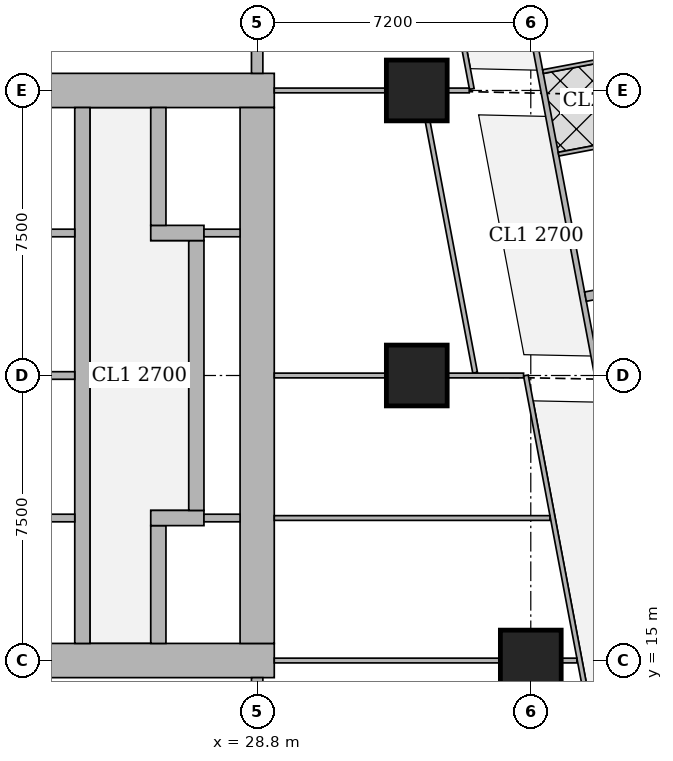
"""IFC4 building model, lengths in metres.
Left out: names, types, materials, properties, quantities, classifications, styles, units other than length and angle.
Written with IfcOpenShell. Run it as: python <this file> out.ifc"""

import sys

from ifc_helpers import new_model, si_unit, direction, frame, frame_2d, origin, origin_2d, place, context, subcontext, project, spatial, rectangle, extrude, element, fill, save


model = new_model("IFC4")
c1 = context("Model", 3, precision=1e-05, world=origin(), true_north=direction((0.0, 1.0)))
c2 = subcontext(c1, "Body", "Model", "MODEL_VIEW")
j1 = project(units=[si_unit("LENGTHUNIT", "METRE"), si_unit("PLANEANGLEUNIT", "RADIAN")], contexts=[c1])
p1 = place(None, origin())
s1 = spatial("IfcSite", under=j1, at=p1, CompositionType="ELEMENT")
p2 = place(p1, origin())
s2 = spatial("IfcBuilding", under=s1, at=p2, CompositionType="ELEMENT")
p3 = place(p2, frame((0.0, 0.0, 81.65)))
s3 = spatial("IfcBuildingStorey", under=s2, at=p3, CompositionType="ELEMENT", Elevation=81.65)
for number, where, z_axis, x_axis in (
    (1, (36.0, 15.0, 0.0), (0.0, 0.0, 1.0), (1.0, 0.0, 0.0)),
    (2, (33.0, 22.5, 0.0), (0.0, 0.0, 1.0), (1.0, 0.0, 0.0)),
    (3, (33.0, 30.0, 0.0), (0.0, 0.0, 1.0), (1.0, 0.0, 0.0)),
):
    element("IfcColumn", number, at=place(p3, frame(where, z_axis=z_axis, x_axis=x_axis)), inside=s3, PredefinedType="COLUMN", context=c2, shape_type="SweptSolid", body=[
        extrude(rectangle(XDim=1.6, YDim=1.6, at=origin_2d()), origin(), (0.0, 0.0, 1.0), 3.75),
    ])
p4 = place(p3, frame((13.95, 15.0, 0.0), z_axis=(0.0, 0.0, 1.0), x_axis=(1.0, 0.0, 0.0)))
e4 = element("IfcWall", 4, at=p4, inside=s3, PredefinedType="SHEAR", context=c2, shape_type="SweptSolid", body=[
    extrude(rectangle(XDim=15.3, YDim=0.9, at=frame_2d((7.65, 0.0))), origin(), (0.0, 0.0, 1.0), 3.75),
])
p5 = place(p4, frame((4.45, 0.0, 0.0)))
e5 = element("IfcOpeningElement", 5, at=p5, cuts=e4, PredefinedType="OPENING", context=c2, shape_type="SweptSolid", body=[
    extrude(rectangle(XDim=1.8, YDim=2.1, at=frame_2d((0.9, 1.05))), frame((0.0, 0.46, 0.0), z_axis=(0.0, -1.0, 0.0), x_axis=(1.0, 0.0, 0.0)), (0.0, 0.0, 1.0), 0.92),
])
p6 = place(p4, frame((10.7, 0.0, 0.0)))
e6 = element("IfcOpeningElement", 6, at=p6, cuts=e4, PredefinedType="OPENING", context=c2, shape_type="SweptSolid", body=[
    extrude(rectangle(XDim=1.1, YDim=2.1, at=frame_2d((0.55, 1.05))), frame((0.0, 0.46, 0.0), z_axis=(0.0, -1.0, 0.0), x_axis=(1.0, 0.0, 0.0)), (0.0, 0.0, 1.0), 0.92),
])
p7 = place(p3, frame((13.95, 30.0, 0.0), z_axis=(0.0, 0.0, 1.0), x_axis=(1.0, 0.0, 0.0)))
e7 = element("IfcWall", 7, at=p7, inside=s3, PredefinedType="SHEAR", context=c2, shape_type="SweptSolid", body=[
    extrude(rectangle(XDim=15.3, YDim=0.9, at=frame_2d((7.65, 0.0))), origin(), (0.0, 0.0, 1.0), 3.75),
])
p8 = place(p7, frame((4.45, 0.0, 0.0)))
e8 = element("IfcOpeningElement", 8, at=p8, cuts=e7, PredefinedType="OPENING", context=c2, shape_type="SweptSolid", body=[
    extrude(rectangle(XDim=1.8, YDim=2.1, at=frame_2d((0.9, 1.05))), frame((0.0, 0.46, 0.0), z_axis=(0.0, -1.0, 0.0), x_axis=(1.0, 0.0, 0.0)), (0.0, 0.0, 1.0), 0.92),
])
p9 = place(p7, frame((10.7, 0.0, 0.0)))
e9 = element("IfcOpeningElement", 9, at=p9, cuts=e7, PredefinedType="OPENING", context=c2, shape_type="SweptSolid", body=[
    extrude(rectangle(XDim=1.1, YDim=2.1, at=frame_2d((0.55, 1.05))), frame((0.0, 0.46, 0.0), z_axis=(0.0, -1.0, 0.0), x_axis=(1.0, 0.0, 0.0)), (0.0, 0.0, 1.0), 0.92),
])
p10 = place(p3, frame((28.8, 15.45, 0.0), z_axis=(0.0, 0.0, 1.0), x_axis=(0.0, 1.0, 0.0)))
e10 = element("IfcWall", 10, at=p10, inside=s3, PredefinedType="SHEAR", context=c2, shape_type="SweptSolid", body=[
    extrude(rectangle(XDim=14.1, YDim=0.9, at=frame_2d((7.05, 0.0))), origin(), (0.0, 0.0, 1.0), 3.75),
])
p11 = place(p3, frame((24.2, 15.45, 0.0), z_axis=(0.0, 0.0, 1.0), x_axis=(0.0, 1.0, 0.0)))
e11 = element("IfcWall", 11, at=p11, inside=s3, PredefinedType="SHEAR", context=c2, shape_type="SweptSolid", body=[
    extrude(rectangle(XDim=14.1, YDim=0.4, at=frame_2d((7.05, 0.0))), origin(), (0.0, 0.0, 1.0), 3.75),
])
p12 = place(p3, frame((26.2, 15.45, 0.0), z_axis=(0.0, 0.0, 1.0), x_axis=(0.0, 1.0, 0.0)))
e12 = element("IfcWall", 12, at=p12, inside=s3, PredefinedType="SHEAR", context=c2, shape_type="SweptSolid", body=[
    extrude(rectangle(XDim=3.1, YDim=0.4, at=frame_2d((1.55, 0.0))), origin(), (0.0, 0.0, 1.0), 3.75),
])
p13 = place(p12, frame((0.825, 0.0, 0.0)))
e13 = element("IfcOpeningElement", 13, at=p13, cuts=e12, PredefinedType="OPENING", context=c2, shape_type="SweptSolid", body=[
    extrude(rectangle(XDim=1.2, YDim=2.1, at=frame_2d((0.6, 1.05))), frame((0.0, 0.21, 0.0), z_axis=(0.0, -1.0, 0.0), x_axis=(1.0, 0.0, 0.0)), (0.0, 0.0, 1.0), 0.42),
])
p14 = place(p3, frame((26.0, 18.75, 0.0), z_axis=(0.0, 0.0, 1.0), x_axis=(1.0, 0.0, 0.0)))
e14 = element("IfcWall", 14, at=p14, inside=s3, PredefinedType="SHEAR", context=c2, shape_type="SweptSolid", body=[
    extrude(rectangle(XDim=1.4, YDim=0.4, at=frame_2d((0.7, 0.0))), origin(), (0.0, 0.0, 1.0), 3.75),
])
p15 = place(p3, frame((27.2, 18.95, 0.0), z_axis=(0.0, 0.0, 1.0), x_axis=(0.0, 1.0, 0.0)))
e15 = element("IfcWall", 15, at=p15, inside=s3, PredefinedType="SHEAR", context=c2, shape_type="SweptSolid", body=[
    extrude(rectangle(XDim=7.1, YDim=0.4, at=frame_2d((3.55, 0.0))), origin(), (0.0, 0.0, 1.0), 3.75),
])
p16 = place(p3, frame((26.0, 26.25, 0.0), z_axis=(0.0, 0.0, 1.0), x_axis=(1.0, 0.0, 0.0)))
e16 = element("IfcWall", 16, at=p16, inside=s3, PredefinedType="SHEAR", context=c2, shape_type="SweptSolid", body=[
    extrude(rectangle(XDim=1.4, YDim=0.4, at=frame_2d((0.7, 0.0))), origin(), (0.0, 0.0, 1.0), 3.75),
])
p17 = place(p3, frame((26.2, 26.45, 0.0), z_axis=(0.0, 0.0, 1.0), x_axis=(0.0, 1.0, 0.0)))
e17 = element("IfcWall", 17, at=p17, inside=s3, PredefinedType="SHEAR", context=c2, shape_type="SweptSolid", body=[
    extrude(rectangle(XDim=3.1, YDim=0.4, at=frame_2d((1.55, 0.0))), origin(), (0.0, 0.0, 1.0), 3.75),
])
p18 = place(p17, frame((1.075, 0.0, 0.0)))
e18 = element("IfcOpeningElement", 18, at=p18, cuts=e17, PredefinedType="OPENING", context=c2, shape_type="SweptSolid", body=[
    extrude(rectangle(XDim=1.2, YDim=2.1, at=frame_2d((0.6, 1.05))), frame((0.0, 0.21, 0.0), z_axis=(0.0, -1.0, 0.0), x_axis=(1.0, 0.0, 0.0)), (0.0, 0.0, 1.0), 0.42),
])
for number, where, z_axis, x_axis in (
    (19, (28.8, 10.35, 0.0), (0.0, 0.0, 1.0), (0.0, 1.0, 0.0)),
    (20, (28.8, 30.45, 0.0), (0.0, 0.0, 1.0), (0.0, 1.0, 0.0)),
):
    element("IfcWall", number, at=place(p3, frame(where, z_axis=z_axis, x_axis=x_axis)), inside=s3, PredefinedType="SHEAR", context=c2, shape_type="SweptSolid", body=[
        extrude(rectangle(XDim=4.2, YDim=0.3, at=frame_2d((2.1, 0.0))), origin(), (0.0, 0.0, 1.0), 3.75),
    ])
p19 = place(p3, frame((33.382, 45.65, 0.0), z_axis=(0.0, 0.0, 1.0), x_axis=(0.185593544777, -0.982626600565, 0.0)))
e21 = element("IfcWall", 21, at=p19, inside=s3, PredefinedType="SOLIDWALL", context=c2, shape_type="SweptSolid", body=[
    extrude(rectangle(XDim=47.118, YDim=0.15, at=frame_2d((23.559, 0.0))), origin(), (0.0, 0.0, 1.0), 2.2),
])
p20 = place(p19, frame((19.054, 0.0, 0.0)))
e22 = element("IfcOpeningElement", 22, at=p20, cuts=e21, PredefinedType="OPENING", context=c2, shape_type="SweptSolid", body=[
    extrude(rectangle(XDim=1.0, YDim=2.1, at=frame_2d((0.5, 1.05))), frame((0.0, 0.085, 0.0), z_axis=(0.0, -1.0, 0.0), x_axis=(1.0, 0.0, 0.0)), (0.0, 0.0, 1.0), 0.17),
])
p21 = place(p19, frame((22.87, 0.0, 0.0)))
e23 = element("IfcOpeningElement", 23, at=p21, cuts=e21, PredefinedType="OPENING", context=c2, shape_type="SweptSolid", body=[
    extrude(rectangle(XDim=1.0, YDim=2.1, at=frame_2d((0.5, 1.05))), frame((0.0, 0.085, 0.0), z_axis=(0.0, -1.0, 0.0), x_axis=(1.0, 0.0, 0.0)), (0.0, 0.0, 1.0), 0.17),
])
p22 = place(p19, frame((33.833, 0.0, 0.0)))
e24 = element("IfcOpeningElement", 24, at=p22, cuts=e21, PredefinedType="OPENING", context=c2, shape_type="SweptSolid", body=[
    extrude(rectangle(XDim=1.0, YDim=2.1, at=frame_2d((0.5, 1.05))), frame((0.0, 0.085, 0.0), z_axis=(0.0, -1.0, 0.0), x_axis=(1.0, 0.0, 0.0)), (0.0, 0.0, 1.0), 0.17),
])
p23 = place(p3, frame((37.473, 42.309, 0.0), z_axis=(0.0, 0.0, 1.0), x_axis=(0.185570636839, -0.982630927024, 0.0)))
e25 = element("IfcWall", 25, at=p23, inside=s3, PredefinedType="PARTITIONING", context=c2, shape_type="SweptSolid", body=[
    extrude(rectangle(XDim=13.553, YDim=0.1, at=frame_2d((6.777, 0.0))), origin(), (0.0, 0.0, 1.0), 2.5),
])
p24 = place(p23, frame((12.049, 0.0, 0.0)))
e26 = element("IfcOpeningElement", 26, at=p24, cuts=e25, PredefinedType="OPENING", context=c2, shape_type="SweptSolid", body=[
    extrude(rectangle(XDim=0.9, YDim=2.1, at=frame_2d((0.45, 1.05))), frame((0.0, 0.06, 0.0), z_axis=(0.0, -1.0, 0.0), x_axis=(1.0, 0.0, 0.0)), (0.0, 0.0, 1.0), 0.12),
])
p25 = place(p23, frame((8.427, 0.0, 0.0)))
e27 = element("IfcOpeningElement", 27, at=p25, cuts=e25, PredefinedType="OPENING", context=c2, shape_type="SweptSolid", body=[
    extrude(rectangle(XDim=0.9, YDim=2.1, at=frame_2d((0.45, 1.05))), frame((0.0, 0.06, 0.0), z_axis=(0.0, -1.0, 0.0), x_axis=(1.0, 0.0, 0.0)), (0.0, 0.0, 1.0), 0.12),
])
p26 = place(p23, frame((2.853, 0.0, 0.0)))
e28 = element("IfcOpeningElement", 28, at=p26, cuts=e25, PredefinedType="OPENING", context=c2, shape_type="SweptSolid", body=[
    extrude(rectangle(XDim=0.9, YDim=2.1, at=frame_2d((0.45, 1.05))), frame((0.0, 0.06, 0.0), z_axis=(0.0, -1.0, 0.0), x_axis=(1.0, 0.0, 0.0)), (0.0, 0.0, 1.0), 0.12),
])
p27 = place(p23, frame((10.14, 0.0, 0.0)))
e29 = element("IfcOpeningElement", 29, at=p27, cuts=e25, PredefinedType="OPENING", context=c2, shape_type="SweptSolid", body=[
    extrude(rectangle(XDim=0.9, YDim=2.1, at=frame_2d((0.45, 1.05))), frame((0.0, 0.06, 0.0), z_axis=(0.0, -1.0, 0.0), x_axis=(1.0, 0.0, 0.0)), (0.0, 0.0, 1.0), 0.12),
])
p28 = place(p23, frame((5.759, 0.0, 0.0)))
e30 = element("IfcOpeningElement", 30, at=p28, cuts=e25, PredefinedType="OPENING", context=c2, shape_type="SweptSolid", body=[
    extrude(rectangle(XDim=0.9, YDim=2.1, at=frame_2d((0.45, 1.05))), frame((0.0, 0.06, 0.0), z_axis=(0.0, -1.0, 0.0), x_axis=(1.0, 0.0, 0.0)), (0.0, 0.0, 1.0), 0.12),
])
p29 = place(p3, frame((39.997, 28.942, 0.0), z_axis=(0.0, 0.0, 1.0), x_axis=(-0.982569883123, -0.185893584556, 0.0)))
e31 = element("IfcWall", 31, at=p29, inside=s3, PredefinedType="PARTITIONING", context=c2, shape_type="SweptSolid", body=[
    extrude(rectangle(XDim=3.324, YDim=0.1, at=frame_2d((1.662, 0.0))), origin(), (0.0, 0.0, 1.0), 3.5),
])
p30 = place(p3, frame((39.538, 31.104, 0.0), z_axis=(0.0, 0.0, 1.0), x_axis=(-0.982610347627, -0.185679575441, 0.0)))
e32 = element("IfcWall", 32, at=p30, inside=s3, PredefinedType="PARTITIONING", context=c2, shape_type="SweptSolid", body=[
    extrude(rectangle(XDim=3.274, YDim=0.1, at=frame_2d((1.637, 0.0))), origin(), (0.0, 0.0, 1.0), 2.5),
])
p31 = place(p3, frame((41.885, 25.415, 0.0), z_axis=(0.0, 0.0, 1.0), x_axis=(-0.982612837616, -0.185666398014, 0.0)))
e33 = element("IfcWall", 33, at=p31, inside=s3, PredefinedType="SOLIDWALL", context=c2, shape_type="SweptSolid", body=[
    extrude(rectangle(XDim=4.525, YDim=0.25, at=frame_2d((2.262, 0.0))), origin(), (0.0, 0.0, 1.0), 3.5),
])
p32 = place(p3, frame((38.202, 10.163, 0.0), z_axis=(0.0, 0.0, 1.0), x_axis=(-0.185645577403, 0.982616771479, 0.0)))
e34 = element("IfcWall", 34, at=p32, inside=s3, PredefinedType="PARTITIONING", context=c2, shape_type="SweptSolid", body=[
    extrude(rectangle(XDim=12.555, YDim=0.125, at=frame_2d((6.278, 0.0))), origin(), (0.0, 0.0, 1.0), 2.5),
])
p33 = place(p32, frame((0.708, 0.0, 0.0)))
e35 = element("IfcOpeningElement", 35, at=p33, cuts=e34, PredefinedType="OPENING", context=c2, shape_type="SweptSolid", body=[
    extrude(rectangle(XDim=1.0, YDim=2.1, at=frame_2d((0.5, 1.05))), frame((0.0, 0.073, 0.0), z_axis=(0.0, -1.0, 0.0), x_axis=(1.0, 0.0, 0.0)), (0.0, 0.0, 1.0), 0.145),
])
p34 = place(p32, frame((6.0, 0.0, 0.0)))
e36 = element("IfcOpeningElement", 36, at=p34, cuts=e34, PredefinedType="OPENING", context=c2, shape_type="SweptSolid", body=[
    extrude(rectangle(XDim=1.0, YDim=2.1, at=frame_2d((0.5, 1.05))), frame((0.0, 0.073, 0.0), z_axis=(0.0, -1.0, 0.0), x_axis=(1.0, 0.0, 0.0)), (0.0, 0.0, 1.0), 0.145),
])
p35 = place(p32, frame((9.562, 0.0, 0.0)))
e37 = element("IfcOpeningElement", 37, at=p35, cuts=e34, PredefinedType="OPENING", context=c2, shape_type="SweptSolid", body=[
    extrude(rectangle(XDim=1.0, YDim=2.1, at=frame_2d((0.5, 1.05))), frame((0.0, 0.073, 0.0), z_axis=(0.0, -1.0, 0.0), x_axis=(1.0, 0.0, 0.0)), (0.0, 0.0, 1.0), 0.145),
])
p36 = place(p3, frame((34.448, 30.04, 0.0), z_axis=(0.0, 0.0, 1.0), x_axis=(-0.185749459238, 0.982597139418, 0.0)))
e38 = element("IfcWall", 38, at=p36, inside=s3, PredefinedType="PARTITIONING", context=c2, shape_type="SweptSolid", body=[
    extrude(rectangle(XDim=4.883, YDim=0.125, at=frame_2d((2.441, 0.0))), origin(), (0.0, 0.0, 1.0), 2.5),
])
p37 = place(p36, frame((1.05, 0.0, 0.0)))
e39 = element("IfcOpeningElement", 39, at=p37, cuts=e38, PredefinedType="OPENING", context=c2, shape_type="SweptSolid", body=[
    extrude(rectangle(XDim=1.0, YDim=2.1, at=frame_2d((0.5, 1.05))), frame((0.0, 0.073, 0.0), z_axis=(0.0, -1.0, 0.0), x_axis=(1.0, 0.0, 0.0)), (0.0, 0.0, 1.0), 0.145),
])
p38 = place(p3, frame((34.535, 22.574, 0.0), z_axis=(0.0, 0.0, 1.0), x_axis=(-0.185591596381, 0.982626968566, 0.0)))
e40 = element("IfcWall", 40, at=p38, inside=s3, PredefinedType="PARTITIONING", context=c2, shape_type="SweptSolid", body=[
    extrude(rectangle(XDim=6.73, YDim=0.125, at=frame_2d((3.365, 0.0))), origin(), (0.0, 0.0, 1.0), 2.5),
])
p39 = place(p38, frame((3.241, 0.0, 0.0)))
e41 = element("IfcOpeningElement", 41, at=p39, cuts=e40, PredefinedType="OPENING", context=c2, shape_type="SweptSolid", body=[
    extrude(rectangle(XDim=1.0, YDim=2.1, at=frame_2d((0.5, 1.05))), frame((0.0, 0.073, 0.0), z_axis=(0.0, -1.0, 0.0), x_axis=(1.0, 0.0, 0.0)), (0.0, 0.0, 1.0), 0.145),
])
p40 = place(p3, frame((29.25, 15.0, 0.0), z_axis=(0.0, 0.0, 1.0), x_axis=(1.0, 0.0, 0.0)))
e42 = element("IfcWall", 42, at=p40, inside=s3, PredefinedType="PARTITIONING", context=c2, shape_type="SweptSolid", body=[
    extrude(rectangle(XDim=5.949, YDim=0.125, at=frame_2d((2.975, 0.0))), origin(), (0.0, 0.0, 1.0), 3.5),
])
p41 = place(p3, frame((36.801, 15.0, 0.0), z_axis=(0.0, 0.0, 1.0), x_axis=(1.0, 0.0, 0.0)))
e43 = element("IfcWall", 43, at=p41, inside=s3, PredefinedType="PARTITIONING", context=c2, shape_type="SweptSolid", body=[
    extrude(rectangle(XDim=0.412, YDim=0.125, at=frame_2d((0.206, 0.0))), origin(), (0.0, 0.0, 1.0), 3.5),
])
p42 = place(p3, frame((29.25, 18.75, 0.0), z_axis=(0.0, 0.0, 1.0), x_axis=(1.0, 0.0, 0.0)))
e44 = element("IfcWall", 44, at=p42, inside=s3, PredefinedType="PARTITIONING", context=c2, shape_type="SweptSolid", body=[
    extrude(rectangle(XDim=7.254, YDim=0.125, at=frame_2d((3.627, 0.0))), origin(), (0.0, 0.0, 1.0), 3.5),
])
p43 = place(p3, frame((29.25, 22.5, 0.0), z_axis=(0.0, 0.0, 1.0), x_axis=(1.0, 0.0, 0.0)))
e45 = element("IfcWall", 45, at=p43, inside=s3, PredefinedType="PARTITIONING", context=c2, shape_type="SweptSolid", body=[
    extrude(rectangle(XDim=2.949, YDim=0.125, at=frame_2d((1.475, 0.0))), origin(), (0.0, 0.0, 1.0), 3.5),
])
p44 = place(p3, frame((33.801, 22.5, 0.0), z_axis=(0.0, 0.0, 1.0), x_axis=(1.0, 0.0, 0.0)))
e46 = element("IfcWall", 46, at=p44, inside=s3, PredefinedType="PARTITIONING", context=c2, shape_type="SweptSolid", body=[
    extrude(rectangle(XDim=2.009, YDim=0.125, at=frame_2d((1.004, 0.0))), origin(), (0.0, 0.0, 1.0), 2.5),
])
p45 = place(p3, frame((29.25, 30.0, 0.0), z_axis=(0.0, 0.0, 1.0), x_axis=(1.0, 0.0, 0.0)))
e47 = element("IfcWall", 47, at=p45, inside=s3, PredefinedType="PARTITIONING", context=c2, shape_type="SweptSolid", body=[
    extrude(rectangle(XDim=2.949, YDim=0.125, at=frame_2d((1.475, 0.0))), origin(), (0.0, 0.0, 1.0), 3.5),
])
p46 = place(p3, frame((33.801, 30.0, 0.0), z_axis=(0.0, 0.0, 1.0), x_axis=(1.0, 0.0, 0.0)))
e48 = element("IfcWall", 48, at=p46, inside=s3, PredefinedType="PARTITIONING", context=c2, shape_type="SweptSolid", body=[
    extrude(rectangle(XDim=0.579, YDim=0.125, at=frame_2d((0.29, 0.0))), origin(), (0.0, 0.0, 1.0), 2.5),
])
for number, where, z_axis, x_axis in (
    (49, (21.8, 18.75, 0.0), (0.0, 0.0, 1.0), (1.0, 0.0, 0.0)),
    (50, (21.8, 22.5, 0.0), (0.0, 0.0, 1.0), (1.0, 0.0, 0.0)),
    (51, (21.8, 26.25, 0.0), (0.0, 0.0, 1.0), (1.0, 0.0, 0.0)),
):
    element("IfcWall", number, at=place(p3, frame(where, z_axis=z_axis, x_axis=x_axis)), inside=s3, PredefinedType="SOLIDWALL", context=c2, shape_type="SweptSolid", body=[
        extrude(rectangle(XDim=2.2, YDim=0.2, at=frame_2d((1.1, 0.0))), origin(), (0.0, 0.0, 1.0), 3.5),
    ])
for number, where, z_axis, x_axis in (
    (52, (27.4, 18.75, 0.0), (0.0, 0.0, 1.0), (1.0, 0.0, 0.0)),
    (53, (27.4, 26.25, 0.0), (0.0, 0.0, 1.0), (1.0, 0.0, 0.0)),
):
    element("IfcWall", number, at=place(p3, frame(where, z_axis=z_axis, x_axis=x_axis)), inside=s3, PredefinedType="SOLIDWALL", context=c2, shape_type="SweptSolid", body=[
        extrude(rectangle(XDim=0.95, YDim=0.2, at=frame_2d((0.475, 0.0))), origin(), (0.0, 0.0, 1.0), 3.5),
    ])
p47 = place(p20, origin())
e54 = element("IfcDoor", 54, at=p47, inside=s3, OperationType="SINGLE_SWING_RIGHT", PredefinedType="DOOR", context=c2, shape_type="SweptSolid", body=[
    extrude(rectangle(XDim=1.0, YDim=2.1, at=frame_2d((0.5, 1.05))), frame((0.0, 0.025, 0.0), z_axis=(0.0, -1.0, 0.0), x_axis=(1.0, 0.0, 0.0)), (0.0, 0.0, 1.0), 0.05),
])
fill(e22, e54)
p48 = place(p21, origin())
e55 = element("IfcDoor", 55, at=p48, inside=s3, OperationType="SINGLE_SWING_LEFT", PredefinedType="DOOR", context=c2, shape_type="SweptSolid", body=[
    extrude(rectangle(XDim=1.0, YDim=2.1, at=frame_2d((0.5, 1.05))), frame((0.0, 0.025, 0.0), z_axis=(0.0, -1.0, 0.0), x_axis=(1.0, 0.0, 0.0)), (0.0, 0.0, 1.0), 0.05),
])
fill(e23, e55)
p49 = place(p34, origin())
e56 = element("IfcDoor", 56, at=p49, inside=s3, OperationType="SINGLE_SWING_LEFT", PredefinedType="DOOR", context=c2, shape_type="SweptSolid", body=[
    extrude(rectangle(XDim=1.0, YDim=2.1, at=frame_2d((0.5, 1.05))), frame((0.0, 0.025, 0.0), z_axis=(0.0, -1.0, 0.0), x_axis=(1.0, 0.0, 0.0)), (0.0, 0.0, 1.0), 0.05),
])
fill(e36, e56)
p50 = place(p35, origin())
e57 = element("IfcDoor", 57, at=p50, inside=s3, OperationType="SINGLE_SWING_LEFT", PredefinedType="DOOR", context=c2, shape_type="SweptSolid", body=[
    extrude(rectangle(XDim=1.0, YDim=2.1, at=frame_2d((0.5, 1.05))), frame((0.0, 0.025, 0.0), z_axis=(0.0, -1.0, 0.0), x_axis=(1.0, 0.0, 0.0)), (0.0, 0.0, 1.0), 0.05),
])
fill(e37, e57)
p51 = place(p39, origin())
e58 = element("IfcDoor", 58, at=p51, inside=s3, OperationType="SINGLE_SWING_RIGHT", PredefinedType="DOOR", context=c2, shape_type="SweptSolid", body=[
    extrude(rectangle(XDim=1.0, YDim=2.1, at=frame_2d((0.5, 1.05))), frame((0.0, 0.025, 0.0), z_axis=(0.0, -1.0, 0.0), x_axis=(1.0, 0.0, 0.0)), (0.0, 0.0, 1.0), 0.05),
])
fill(e41, e58)
p52 = place(p6, origin())
e59 = element("IfcDoor", 59, at=p52, inside=s3, OperationType="SINGLE_SWING_LEFT", PredefinedType="DOOR", context=c2, shape_type="SweptSolid", body=[
    extrude(rectangle(XDim=1.1, YDim=2.1, at=frame_2d((0.55, 1.05))), frame((0.0, 0.025, 0.0), z_axis=(0.0, -1.0, 0.0), x_axis=(1.0, 0.0, 0.0)), (0.0, 0.0, 1.0), 0.05),
])
fill(e6, e59)
p53 = place(p9, origin())
e60 = element("IfcDoor", 60, at=p53, inside=s3, OperationType="SINGLE_SWING_LEFT", PredefinedType="DOOR", context=c2, shape_type="SweptSolid", body=[
    extrude(rectangle(XDim=1.1, YDim=2.1, at=frame_2d((0.55, 1.05))), frame((0.0, 0.025, 0.0), z_axis=(0.0, -1.0, 0.0), x_axis=(1.0, 0.0, 0.0)), (0.0, 0.0, 1.0), 0.05),
])
fill(e9, e60)
p54 = place(p13, origin())
e61 = element("IfcDoor", 61, at=p54, inside=s3, OperationType="DOUBLE_DOOR_SLIDING", PredefinedType="DOOR", context=c2, shape_type="SweptSolid", body=[
    extrude(rectangle(XDim=1.2, YDim=2.1, at=frame_2d((0.6, 1.05))), frame((0.0, 0.025, 0.0), z_axis=(0.0, -1.0, 0.0), x_axis=(1.0, 0.0, 0.0)), (0.0, 0.0, 1.0), 0.05),
])
fill(e13, e61)
p55 = place(p18, origin())
e62 = element("IfcDoor", 62, at=p55, inside=s3, OperationType="DOUBLE_DOOR_SLIDING", PredefinedType="DOOR", context=c2, shape_type="SweptSolid", body=[
    extrude(rectangle(XDim=1.2, YDim=2.1, at=frame_2d((0.6, 1.05))), frame((0.0, 0.025, 0.0), z_axis=(0.0, -1.0, 0.0), x_axis=(1.0, 0.0, 0.0)), (0.0, 0.0, 1.0), 0.05),
])
fill(e18, e62)
save(model, sys.argv[1])
